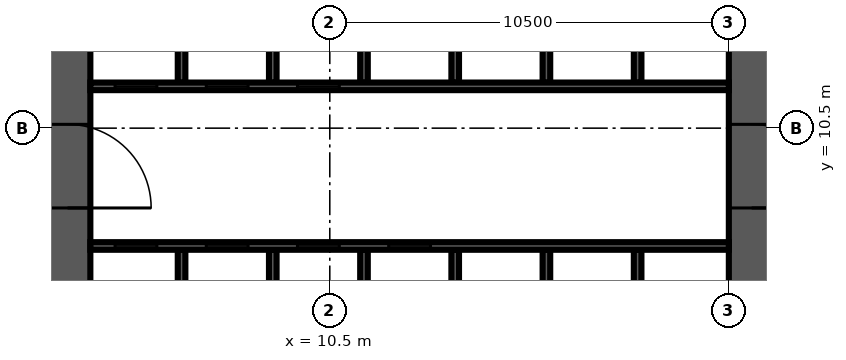
"""IFC4 building model, lengths in metres.
Left out: names, types, materials, properties, quantities, classifications, styles, units other than length and angle.
Written with IfcOpenShell. Run it as: python <this file> out.ifc"""

import sys

from ifc_helpers import new_model, si_unit, direction, frame, frame_2d, origin, place, context, subcontext, project, spatial, rectangle, extrude, source, transform, mapped, element, fill, save


model = new_model("IFC4")
c1 = context("Model", 3, precision=1e-05, world=origin(), true_north=direction((0.0, 1.0)))
c2 = subcontext(c1, "Body", "Model", "MODEL_VIEW")
j1 = project(units=[si_unit("LENGTHUNIT", "METRE"), si_unit("PLANEANGLEUNIT", "RADIAN")], contexts=[c1])
p1 = place(None, origin())
s1 = spatial("IfcSite", under=j1, at=p1, CompositionType="ELEMENT")
p2 = place(p1, origin())
s2 = spatial("IfcBuilding", under=s1, at=p2, CompositionType="ELEMENT")
p3 = place(p2, frame((0.0, 0.0, 74.1)))
s3 = spatial("IfcBuildingStorey", under=s2, at=p3, CompositionType="ELEMENT", Elevation=74.1)
m1 = source(origin(), c2, "Body", "SweptSolid", [
    extrude(rectangle(XDim=18.0, YDim=1.2, at=frame_2d((9.0, 0.0))), origin(), (0.0, 0.0, 1.0), 4.2),
])
p4 = place(p3, frame((3.6, 4.2, 0.0), z_axis=(0.0, 0.0, 1.0), x_axis=(0.0, 1.0, 0.0)))
e1 = element("IfcWall", 1, at=p4, inside=s3, PredefinedType="SHEAR", context=c2, shape_type="MappedRepresentation", body=[
    mapped(m1, transform((0.0, 0.0, 0.0), scale=1.0)),
])
m2 = source(origin(), c2, "Body", "SweptSolid", [
    extrude(rectangle(XDim=2.2, YDim=2.1, at=frame_2d((1.1, 1.05))), frame((0.0, 0.61, 0.0), z_axis=(0.0, -1.0, 0.0), x_axis=(1.0, 0.0, 0.0)), (0.0, 0.0, 1.0), 1.22),
])
p5 = place(p4, frame((4.2, 0.0, 0.0)))
e2 = element("IfcOpeningElement", 2, at=p5, cuts=e1, PredefinedType="OPENING", context=c2, shape_type="MappedRepresentation", body=[
    mapped(m2, transform((0.0, 0.0, 0.0), scale=1.0)),
])
m3 = source(origin(), c2, "Body", "SweptSolid", [
    extrude(rectangle(XDim=16.8, YDim=1.2, at=frame_2d((8.4, 0.0))), origin(), (0.0, 0.0, 1.0), 4.2),
])
p6 = place(p3, frame((21.6, 4.2, 0.0), z_axis=(0.0, 0.0, 1.0), x_axis=(0.0, 1.0, 0.0)))
e3 = element("IfcWall", 3, at=p6, inside=s3, PredefinedType="SHEAR", context=c2, shape_type="MappedRepresentation", body=[
    mapped(m3, transform((0.0, 0.0, 0.0), scale=1.0)),
])
p7 = place(p6, frame((4.2, 0.0, 0.0)))
e4 = element("IfcOpeningElement", 4, at=p7, cuts=e3, PredefinedType="OPENING", context=c2, shape_type="MappedRepresentation", body=[
    mapped(m2, transform((0.0, 0.0, 0.0), scale=1.0)),
])
m4 = source(origin(), c2, "Body", "SweptSolid", [
    extrude(rectangle(XDim=1.2, YDim=2.1, at=frame_2d((0.6, 1.05))), frame((0.0, 0.61, 0.0), z_axis=(0.0, -1.0, 0.0), x_axis=(1.0, 0.0, 0.0)), (0.0, 0.0, 1.0), 1.22),
])
p8 = place(p6, frame((14.7, 0.0, 0.0)))
e5 = element("IfcOpeningElement", 5, at=p8, cuts=e3, PredefinedType="OPENING", context=c2, shape_type="MappedRepresentation", body=[
    mapped(m4, transform((0.0, 0.0, 0.0), scale=1.0)),
])
m5 = source(origin(), c2, "Body", "SweptSolid", [
    extrude(rectangle(XDim=3.1, YDim=0.2, at=frame_2d((1.55, 0.0))), origin(), (0.0, 0.0, 1.0), 4.2),
])
for number, where, z_axis, x_axis in (
    (6, (6.6, 4.2, 0.0), (0.0, 0.0, 1.0), (0.0, 1.0, 0.0)),
    (7, (9.0, 4.2, 0.0), (0.0, 0.0, 1.0), (0.0, 1.0, 0.0)),
    (8, (11.4, 4.2, 0.0), (0.0, 0.0, 1.0), (0.0, 1.0, 0.0)),
    (9, (13.8, 4.2, 0.0), (0.0, 0.0, 1.0), (0.0, 1.0, 0.0)),
    (10, (16.2, 4.2, 0.0), (0.0, 0.0, 1.0), (0.0, 1.0, 0.0)),
    (11, (18.6, 4.2, 0.0), (0.0, 0.0, 1.0), (0.0, 1.0, 0.0)),
):
    element("IfcWall", number, at=place(p3, frame(where, z_axis=z_axis, x_axis=x_axis)), inside=s3, PredefinedType="SOLIDWALL", context=c2, shape_type="MappedRepresentation", body=[
        mapped(m5, transform((0.0, 0.0, 0.0), scale=1.0)),
    ])
m6 = source(origin(), c2, "Body", "SweptSolid", [
    extrude(rectangle(XDim=3.0, YDim=0.2, at=frame_2d((1.5, 0.0))), origin(), (0.0, 0.0, 1.0), 4.2),
])
for number, where, z_axis, x_axis in (
    (12, (6.6, 11.7, 0.0), (0.0, 0.0, 1.0), (0.0, 1.0, 0.0)),
    (13, (9.0, 11.7, 0.0), (0.0, 0.0, 1.0), (0.0, 1.0, 0.0)),
    (14, (11.4, 11.7, 0.0), (0.0, 0.0, 1.0), (0.0, 1.0, 0.0)),
    (15, (13.8, 11.7, 0.0), (0.0, 0.0, 1.0), (0.0, 1.0, 0.0)),
    (16, (16.2, 11.7, 0.0), (0.0, 0.0, 1.0), (0.0, 1.0, 0.0)),
    (17, (18.6, 11.7, 0.0), (0.0, 0.0, 1.0), (0.0, 1.0, 0.0)),
):
    element("IfcWall", number, at=place(p3, frame(where, z_axis=z_axis, x_axis=x_axis)), inside=s3, PredefinedType="SOLIDWALL", context=c2, shape_type="MappedRepresentation", body=[
        mapped(m6, transform((0.0, 0.0, 0.0), scale=1.0)),
    ])
m7 = source(origin(), c2, "Body", "SweptSolid", [
    extrude(rectangle(XDim=16.8, YDim=0.2, at=frame_2d((8.4, 0.0))), origin(), (0.0, 0.0, 1.0), 4.2),
])
p9 = place(p3, frame((4.2, 7.4, 0.0), z_axis=(0.0, 0.0, 1.0), x_axis=(1.0, 0.0, 0.0)))
e18 = element("IfcWall", 18, at=p9, inside=s3, PredefinedType="SOLIDWALL", context=c2, shape_type="MappedRepresentation", body=[
    mapped(m7, transform((0.0, 0.0, 0.0), scale=1.0)),
])
m8 = source(origin(), c2, "Body", "SweptSolid", [
    extrude(rectangle(XDim=1.1, YDim=2.1, at=frame_2d((0.55, 1.05))), frame((0.0, 0.11, 0.0), z_axis=(0.0, -1.0, 0.0), x_axis=(1.0, 0.0, 0.0)), (0.0, 0.0, 1.0), 0.22),
])
p10 = place(p9, frame((0.65, 0.0, 0.0)))
e19 = element("IfcOpeningElement", 19, at=p10, cuts=e18, PredefinedType="OPENING", context=c2, shape_type="MappedRepresentation", body=[
    mapped(m8, transform((0.0, 0.0, 0.0), scale=1.0)),
])
p11 = place(p9, frame((3.05, 0.0, 0.0)))
e20 = element("IfcOpeningElement", 20, at=p11, cuts=e18, PredefinedType="OPENING", context=c2, shape_type="MappedRepresentation", body=[
    mapped(m8, transform((0.0, 0.0, 0.0), scale=1.0)),
])
p12 = place(p9, frame((5.45, 0.0, 0.0)))
e21 = element("IfcOpeningElement", 21, at=p12, cuts=e18, PredefinedType="OPENING", context=c2, shape_type="MappedRepresentation", body=[
    mapped(m8, transform((0.0, 0.0, 0.0), scale=1.0)),
])
p13 = place(p9, frame((7.85, 0.0, 0.0)))
e22 = element("IfcOpeningElement", 22, at=p13, cuts=e18, PredefinedType="OPENING", context=c2, shape_type="MappedRepresentation", body=[
    mapped(m8, transform((0.0, 0.0, 0.0), scale=1.0)),
])
p14 = place(p3, frame((4.2, 11.6, 0.0), z_axis=(0.0, 0.0, 1.0), x_axis=(1.0, 0.0, 0.0)))
e23 = element("IfcWall", 23, at=p14, inside=s3, PredefinedType="SOLIDWALL", context=c2, shape_type="MappedRepresentation", body=[
    mapped(m7, transform((0.0, 0.0, 0.0), scale=1.0)),
])
p15 = place(p14, frame((0.65, 0.0, 0.0)))
e24 = element("IfcOpeningElement", 24, at=p15, cuts=e23, PredefinedType="OPENING", context=c2, shape_type="MappedRepresentation", body=[
    mapped(m8, transform((0.0, 0.0, 0.0), scale=1.0)),
])
p16 = place(p14, frame((3.05, 0.0, 0.0)))
e25 = element("IfcOpeningElement", 25, at=p16, cuts=e23, PredefinedType="OPENING", context=c2, shape_type="MappedRepresentation", body=[
    mapped(m8, transform((0.0, 0.0, 0.0), scale=1.0)),
])
p17 = place(p14, frame((5.45, 0.0, 0.0)))
e26 = element("IfcOpeningElement", 26, at=p17, cuts=e23, PredefinedType="OPENING", context=c2, shape_type="MappedRepresentation", body=[
    mapped(m8, transform((0.0, 0.0, 0.0), scale=1.0)),
])
m9 = source(origin(), c2, "Body", "SweptSolid", [
    extrude(rectangle(XDim=1.1, YDim=2.1, at=frame_2d((0.55, 1.05))), frame((0.0, 0.025, 0.0), z_axis=(0.0, -1.0, 0.0), x_axis=(1.0, 0.0, 0.0)), (0.0, 0.0, 1.0), 0.05),
])
p18 = place(p10, origin())
e27 = element("IfcDoor", 27, at=p18, inside=s3, OperationType="SLIDING_TO_LEFT", PredefinedType="DOOR", context=c2, shape_type="MappedRepresentation", body=[
    mapped(m9, transform((0.0, 0.0, 0.0), scale=1.0)),
])
fill(e19, e27)
p19 = place(p11, origin())
e28 = element("IfcDoor", 28, at=p19, inside=s3, OperationType="SLIDING_TO_LEFT", PredefinedType="DOOR", context=c2, shape_type="MappedRepresentation", body=[
    mapped(m9, transform((0.0, 0.0, 0.0), scale=1.0)),
])
fill(e20, e28)
p20 = place(p12, origin())
e29 = element("IfcDoor", 29, at=p20, inside=s3, OperationType="SLIDING_TO_LEFT", PredefinedType="DOOR", context=c2, shape_type="MappedRepresentation", body=[
    mapped(m9, transform((0.0, 0.0, 0.0), scale=1.0)),
])
fill(e21, e29)
p21 = place(p13, origin())
e30 = element("IfcDoor", 30, at=p21, inside=s3, OperationType="SLIDING_TO_LEFT", PredefinedType="DOOR", context=c2, shape_type="MappedRepresentation", body=[
    mapped(m9, transform((0.0, 0.0, 0.0), scale=1.0)),
])
fill(e22, e30)
p22 = place(p15, origin())
e31 = element("IfcDoor", 31, at=p22, inside=s3, OperationType="SLIDING_TO_LEFT", PredefinedType="DOOR", context=c2, shape_type="MappedRepresentation", body=[
    mapped(m9, transform((0.0, 0.0, 0.0), scale=1.0)),
])
fill(e24, e31)
p23 = place(p16, origin())
e32 = element("IfcDoor", 32, at=p23, inside=s3, OperationType="SLIDING_TO_LEFT", PredefinedType="DOOR", context=c2, shape_type="MappedRepresentation", body=[
    mapped(m9, transform((0.0, 0.0, 0.0), scale=1.0)),
])
fill(e25, e32)
p24 = place(p17, origin())
e33 = element("IfcDoor", 33, at=p24, inside=s3, OperationType="SLIDING_TO_LEFT", PredefinedType="DOOR", context=c2, shape_type="MappedRepresentation", body=[
    mapped(m9, transform((0.0, 0.0, 0.0), scale=1.0)),
])
fill(e26, e33)
m10 = source(origin(), c2, "Body", "SweptSolid", [
    extrude(rectangle(XDim=2.2, YDim=2.1, at=frame_2d((1.1, 1.05))), frame((0.0, 0.025, 0.0), z_axis=(0.0, -1.0, 0.0), x_axis=(1.0, 0.0, 0.0)), (0.0, 0.0, 1.0), 0.05),
])
p25 = place(p7, origin())
e34 = element("IfcDoor", 34, at=p25, inside=s3, OperationType="DOUBLE_DOOR_SINGLE_SWING", PredefinedType="DOOR", context=c2, shape_type="MappedRepresentation", body=[
    mapped(m10, transform((0.0, 0.0, 0.0), scale=1.0)),
])
fill(e4, e34)
p26 = place(p5, origin())
e35 = element("IfcDoor", 35, at=p26, inside=s3, OperationType="DOUBLE_DOOR_SINGLE_SWING", PredefinedType="DOOR", context=c2, shape_type="MappedRepresentation", body=[
    mapped(m10, transform((0.0, 0.0, 0.0), scale=1.0)),
])
fill(e2, e35)
save(model, sys.argv[1])
